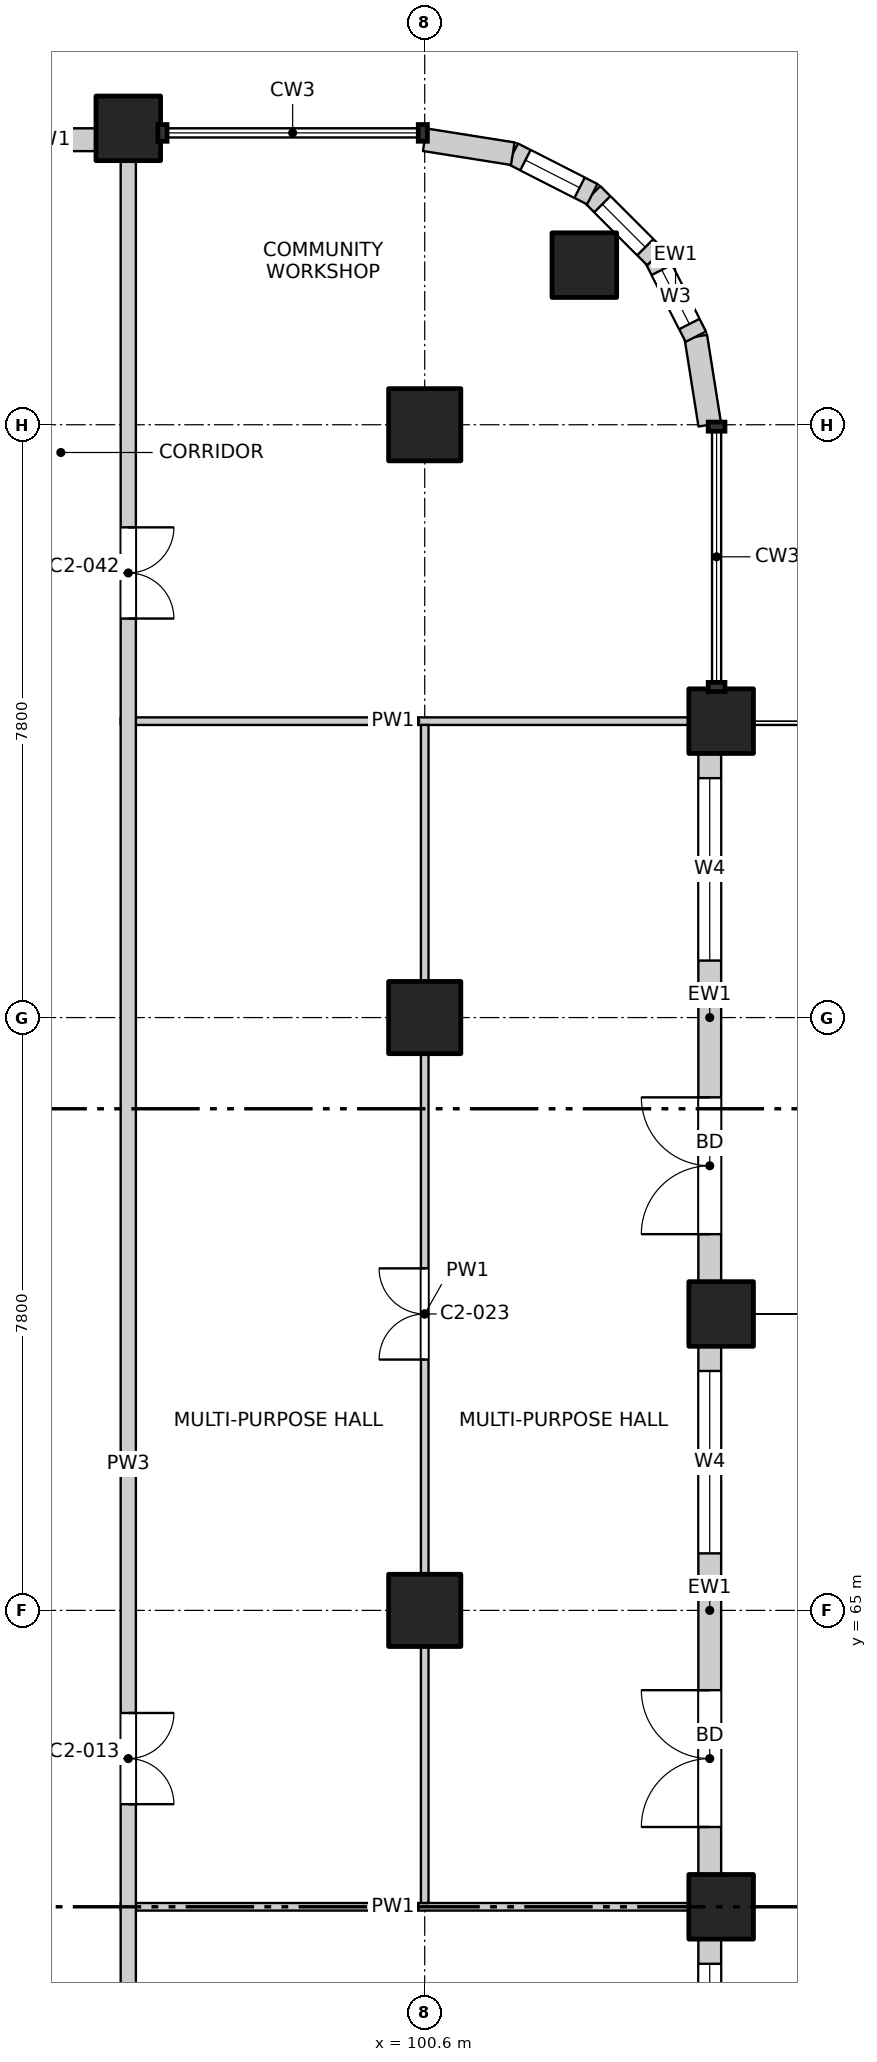
"""IFC4 building model, lengths in metres.
Left out: names, types, materials, properties, quantities, classifications, styles, units other than length and angle.
Written with IfcOpenShell. Run it as: python <this file> out.ifc"""

import sys

from ifc_helpers import new_model, si_unit, direction, frame, frame_2d, origin, origin_2d, place, context, subcontext, project, spatial, rectangle, extrude, element, fill, save


model = new_model("IFC4")
c1 = context("Model", 3, precision=1e-05, world=origin(), true_north=direction((0.0, 1.0)))
c2 = subcontext(c1, "Body", "Model", "MODEL_VIEW")
j1 = project(units=[si_unit("LENGTHUNIT", "METRE"), si_unit("PLANEANGLEUNIT", "RADIAN")], contexts=[c1])
p1 = place(None, origin())
s1 = spatial("IfcSite", under=j1, at=p1, CompositionType="ELEMENT")
p2 = place(p1, origin())
s2 = spatial("IfcBuilding", under=s1, at=p2, CompositionType="ELEMENT")
p3 = place(p2, frame((0.0, 0.0, 133.9)))
s3 = spatial("IfcBuildingStorey", under=s2, at=p3, CompositionType="ELEMENT", Elevation=133.9)
for number, where, z_axis, x_axis in (
    (1, (102.7, 82.7, -0.25), (0.0, 0.0, 1.0), (1.0, 0.0, 0.0)),
    (2, (104.5, 61.1, -0.25), (0.0, 0.0, 1.0), (1.0, 0.0, 0.0)),
    (3, (104.5, 68.9, -0.25), (0.0, 0.0, 1.0), (1.0, 0.0, 0.0)),
    (4, (104.5, 76.7, -0.25), (0.0, 0.0, 1.0), (1.0, 0.0, 0.0)),
    (5, (96.7, 84.5, -0.25), (0.0, 0.0, 1.0), (1.0, 0.0, 0.0)),
):
    element("IfcColumn", number, at=place(p3, frame(where, z_axis=z_axis, x_axis=x_axis)), inside=s3, PredefinedType="COLUMN", context=c2, shape_type="SweptSolid", body=[
        extrude(rectangle(XDim=0.85, YDim=0.85, at=origin_2d()), origin(), (0.0, 0.0, 1.0), 3.4),
    ])
for number, where, z_axis, x_axis in (
    (6, (100.6, 65.0, -0.25), (0.0, 0.0, 1.0), (1.0, 0.0, 0.0)),
    (7, (100.6, 72.8, -0.25), (0.0, 0.0, 1.0), (1.0, 0.0, 0.0)),
    (8, (100.6, 80.6, -0.25), (0.0, 0.0, 1.0), (1.0, 0.0, 0.0)),
):
    element("IfcColumn", number, at=place(p3, frame(where, z_axis=z_axis, x_axis=x_axis)), inside=s3, PredefinedType="COLUMN", context=c2, shape_type="SweptSolid", body=[
        extrude(rectangle(XDim=0.95, YDim=0.95, at=origin_2d()), origin(), (0.0, 0.0, 1.0), 3.4),
    ])
p4 = place(p3, frame((104.35, 53.725, 0.0), z_axis=(0.0, 0.0, 1.0), x_axis=(0.0, 1.0, 0.0)))
e9 = element("IfcWall", 9, at=p4, inside=s3, PredefinedType="SOLIDWALL", context=c2, shape_type="SweptSolid", body=[
    extrude(rectangle(XDim=6.95, YDim=0.3, at=frame_2d((3.475, 0.0))), origin(), (0.0, 0.0, 1.0), 2.7),
])
p5 = place(p4, frame((0.625, 0.0, 0.0)))
e10 = element("IfcOpeningElement", 10, at=p5, cuts=e9, PredefinedType="OPENING", context=c2, shape_type="SweptSolid", body=[
    extrude(rectangle(XDim=1.8, YDim=2.4, at=frame_2d((0.9, 1.2))), frame((0.0, 0.16, 0.0), z_axis=(0.0, -1.0, 0.0), x_axis=(1.0, 0.0, 0.0)), (0.0, 0.0, 1.0), 0.32),
])
p6 = place(p4, frame((4.225, 0.0, 0.6)))
e11 = element("IfcOpeningElement", 11, at=p6, cuts=e9, PredefinedType="OPENING", context=c2, shape_type="SweptSolid", body=[
    extrude(rectangle(XDim=2.4, YDim=2.1, at=frame_2d((1.2, 1.05))), frame((0.0, 0.16, 0.0), z_axis=(0.0, -1.0, 0.0), x_axis=(1.0, 0.0, 0.0)), (0.0, 0.0, 1.0), 0.32),
])
p7 = place(p3, frame((104.35, 61.525, 0.0), z_axis=(0.0, 0.0, 1.0), x_axis=(0.0, 1.0, 0.0)))
e12 = element("IfcWall", 12, at=p7, inside=s3, PredefinedType="SOLIDWALL", context=c2, shape_type="SweptSolid", body=[
    extrude(rectangle(XDim=6.95, YDim=0.3, at=frame_2d((3.475, 0.0))), origin(), (0.0, 0.0, 1.0), 2.7),
])
p8 = place(p7, frame((0.625, 0.0, 0.0)))
e13 = element("IfcOpeningElement", 13, at=p8, cuts=e12, PredefinedType="OPENING", context=c2, shape_type="SweptSolid", body=[
    extrude(rectangle(XDim=1.8, YDim=2.4, at=frame_2d((0.9, 1.2))), frame((0.0, 0.16, 0.0), z_axis=(0.0, -1.0, 0.0), x_axis=(1.0, 0.0, 0.0)), (0.0, 0.0, 1.0), 0.32),
])
p9 = place(p7, frame((4.225, 0.0, 0.6)))
e14 = element("IfcOpeningElement", 14, at=p9, cuts=e12, PredefinedType="OPENING", context=c2, shape_type="SweptSolid", body=[
    extrude(rectangle(XDim=2.4, YDim=2.1, at=frame_2d((1.2, 1.05))), frame((0.0, 0.16, 0.0), z_axis=(0.0, -1.0, 0.0), x_axis=(1.0, 0.0, 0.0)), (0.0, 0.0, 1.0), 0.32),
])
p10 = place(p3, frame((104.35, 69.325, 0.0), z_axis=(0.0, 0.0, 1.0), x_axis=(0.0, 1.0, 0.0)))
e15 = element("IfcWall", 15, at=p10, inside=s3, PredefinedType="SOLIDWALL", context=c2, shape_type="SweptSolid", body=[
    extrude(rectangle(XDim=6.95, YDim=0.3, at=frame_2d((3.475, 0.0))), origin(), (0.0, 0.0, 1.0), 2.7),
])
p11 = place(p10, frame((0.625, 0.0, 0.0)))
e16 = element("IfcOpeningElement", 16, at=p11, cuts=e15, PredefinedType="OPENING", context=c2, shape_type="SweptSolid", body=[
    extrude(rectangle(XDim=1.8, YDim=2.4, at=frame_2d((0.9, 1.2))), frame((0.0, 0.16, 0.0), z_axis=(0.0, -1.0, 0.0), x_axis=(1.0, 0.0, 0.0)), (0.0, 0.0, 1.0), 0.32),
])
p12 = place(p10, frame((4.225, 0.0, 0.6)))
e17 = element("IfcOpeningElement", 17, at=p12, cuts=e15, PredefinedType="OPENING", context=c2, shape_type="SweptSolid", body=[
    extrude(rectangle(XDim=2.4, YDim=2.1, at=frame_2d((1.2, 1.05))), frame((0.0, 0.16, 0.0), z_axis=(0.0, -1.0, 0.0), x_axis=(1.0, 0.0, 0.0)), (0.0, 0.0, 1.0), 0.32),
])
p13 = place(p3, frame((95.025, 84.35, 0.0), z_axis=(0.0, 0.0, 1.0), x_axis=(1.0, 0.0, 0.0)))
e18 = element("IfcWall", 18, at=p13, inside=s3, PredefinedType="SOLIDWALL", context=c2, shape_type="SweptSolid", body=[
    extrude(rectangle(XDim=1.25, YDim=0.3, at=frame_2d((0.625, 0.0))), origin(), (0.0, 0.0, 1.0), 2.7),
])
p14 = place(p3, frame((104.35, 80.6, 0.0), z_axis=(0.0, 0.0, 1.0), x_axis=(-0.156496880861, 0.987678452879, 0.0)))
e19 = element("IfcWall", 19, at=p14, inside=s3, PredefinedType="SOLIDWALL", context=c2, shape_type="SweptSolid", body=[
    extrude(rectangle(XDim=1.173, YDim=0.3, at=frame_2d((0.586, 0.0))), origin(), (0.0, 0.0, 1.0), 2.7),
])
p15 = place(p3, frame((104.167, 81.759, 0.0), z_axis=(0.0, 0.0, 1.0), x_axis=(-0.454025524128, 0.890988677504, 0.0)))
e20 = element("IfcWall", 20, at=p15, inside=s3, PredefinedType="SOLIDWALL", context=c2, shape_type="SweptSolid", body=[
    extrude(rectangle(XDim=1.173, YDim=0.3, at=frame_2d((0.587, 0.0))), origin(), (0.0, 0.0, 1.0), 2.7),
])
p16 = place(p15, frame((0.187, 0.0, 0.9)))
e21 = element("IfcOpeningElement", 21, at=p16, cuts=e20, PredefinedType="OPENING", context=c2, shape_type="SweptSolid", body=[
    extrude(rectangle(XDim=0.8, YDim=1.2, at=frame_2d((0.4, 0.6))), frame((0.0, 0.16, 0.0), z_axis=(0.0, -1.0, 0.0), x_axis=(1.0, 0.0, 0.0)), (0.0, 0.0, 1.0), 0.32),
])
p17 = place(p3, frame((103.634, 82.804, 0.0), z_axis=(0.0, 0.0, 1.0), x_axis=(-0.707106781187, 0.707106781187, 0.0)))
e22 = element("IfcWall", 22, at=p17, inside=s3, PredefinedType="SOLIDWALL", context=c2, shape_type="SweptSolid", body=[
    extrude(rectangle(XDim=1.173, YDim=0.3, at=frame_2d((0.586, 0.0))), origin(), (0.0, 0.0, 1.0), 2.7),
])
p18 = place(p17, frame((0.187, 0.0, 0.9)))
e23 = element("IfcOpeningElement", 23, at=p18, cuts=e22, PredefinedType="OPENING", context=c2, shape_type="SweptSolid", body=[
    extrude(rectangle(XDim=0.8, YDim=1.2, at=frame_2d((0.4, 0.6))), frame((0.0, 0.16, 0.0), z_axis=(0.0, -1.0, 0.0), x_axis=(1.0, 0.0, 0.0)), (0.0, 0.0, 1.0), 0.32),
])
p19 = place(p3, frame((102.804, 83.634, 0.0), z_axis=(0.0, 0.0, 1.0), x_axis=(-0.890988677504, 0.454025524128, 0.0)))
e24 = element("IfcWall", 24, at=p19, inside=s3, PredefinedType="SOLIDWALL", context=c2, shape_type="SweptSolid", body=[
    extrude(rectangle(XDim=1.173, YDim=0.3, at=frame_2d((0.587, 0.0))), origin(), (0.0, 0.0, 1.0), 2.7),
])
p20 = place(p19, frame((0.187, 0.0, 0.9)))
e25 = element("IfcOpeningElement", 25, at=p20, cuts=e24, PredefinedType="OPENING", context=c2, shape_type="SweptSolid", body=[
    extrude(rectangle(XDim=0.8, YDim=1.2, at=frame_2d((0.4, 0.6))), frame((0.0, 0.16, 0.0), z_axis=(0.0, -1.0, 0.0), x_axis=(1.0, 0.0, 0.0)), (0.0, 0.0, 1.0), 0.32),
])
p21 = place(p3, frame((101.759, 84.167, 0.0), z_axis=(0.0, 0.0, 1.0), x_axis=(-0.987678452879, 0.156496880861, 0.0)))
e26 = element("IfcWall", 26, at=p21, inside=s3, PredefinedType="SOLIDWALL", context=c2, shape_type="SweptSolid", body=[
    extrude(rectangle(XDim=1.173, YDim=0.3, at=frame_2d((0.586, 0.0))), origin(), (0.0, 0.0, 1.0), 2.7),
])
for number, where, z_axis, x_axis in (
    (27, (96.6, 61.1, 0.0), (0.0, 0.0, 1.0), (1.0, 0.0, 0.0)),
    (28, (96.6, 76.7, 0.0), (0.0, 0.0, 1.0), (1.0, 0.0, 0.0)),
):
    element("IfcWall", number, at=place(p3, frame(where, z_axis=z_axis, x_axis=x_axis)), inside=s3, PredefinedType="PARTITIONING", context=c2, shape_type="SweptSolid", body=[
        extrude(rectangle(XDim=7.765, YDim=0.1, at=frame_2d((3.882, 0.0))), origin(), (0.0, 0.0, 1.0), 2.55),
    ])
p22 = place(p3, frame((96.7, 49.5, 0.0), z_axis=(0.0, 0.0, 1.0), x_axis=(0.0, 1.0, 0.0)))
e29 = element("IfcWall", 29, at=p22, inside=s3, PredefinedType="PARTITIONING", context=c2, shape_type="SweptSolid", body=[
    extrude(rectangle(XDim=34.865, YDim=0.2, at=frame_2d((17.433, 0.0))), origin(), (0.0, 0.0, 1.0), 3.15),
])
p23 = place(p22, frame((9.05, 0.0, 0.0)))
e30 = element("IfcOpeningElement", 30, at=p23, cuts=e29, PredefinedType="OPENING", context=c2, shape_type="SweptSolid", body=[
    extrude(rectangle(XDim=1.2, YDim=2.1, at=frame_2d((0.6, 1.05))), frame((0.0, 0.11, 0.0), z_axis=(0.0, -1.0, 0.0), x_axis=(1.0, 0.0, 0.0)), (0.0, 0.0, 1.0), 0.22),
])
p24 = place(p22, frame((12.95, 0.0, 0.0)))
e31 = element("IfcOpeningElement", 31, at=p24, cuts=e29, PredefinedType="OPENING", context=c2, shape_type="SweptSolid", body=[
    extrude(rectangle(XDim=1.2, YDim=2.1, at=frame_2d((0.6, 1.05))), frame((0.0, 0.11, 0.0), z_axis=(0.0, -1.0, 0.0), x_axis=(1.0, 0.0, 0.0)), (0.0, 0.0, 1.0), 0.22),
])
p25 = place(p22, frame((28.55, 0.0, 0.0)))
e32 = element("IfcOpeningElement", 32, at=p25, cuts=e29, PredefinedType="OPENING", context=c2, shape_type="SweptSolid", body=[
    extrude(rectangle(XDim=1.2, YDim=2.1, at=frame_2d((0.6, 1.05))), frame((0.0, 0.11, 0.0), z_axis=(0.0, -1.0, 0.0), x_axis=(1.0, 0.0, 0.0)), (0.0, 0.0, 1.0), 0.22),
])
p26 = place(p3, frame((100.6, 61.15, 0.0), z_axis=(0.0, 0.0, 1.0), x_axis=(0.0, 1.0, 0.0)))
e33 = element("IfcWall", 33, at=p26, inside=s3, PredefinedType="PARTITIONING", context=c2, shape_type="SweptSolid", body=[
    extrude(rectangle(XDim=15.5, YDim=0.1, at=frame_2d((7.75, 0.0))), origin(), (0.0, 0.0, 1.0), 3.15),
])
p27 = place(p26, frame((7.15, 0.0, 0.0)))
e34 = element("IfcOpeningElement", 34, at=p27, cuts=e33, PredefinedType="OPENING", context=c2, shape_type="SweptSolid", body=[
    extrude(rectangle(XDim=1.2, YDim=2.1, at=frame_2d((0.6, 1.05))), frame((0.0, 0.06, 0.0), z_axis=(0.0, -1.0, 0.0), x_axis=(1.0, 0.0, 0.0)), (0.0, 0.0, 1.0), 0.12),
])
p28 = place(p6, origin())
e35 = element("IfcWindow", 35, at=p28, inside=s3, PartitioningType="SINGLE_PANEL", PredefinedType="WINDOW", context=c2, shape_type="SweptSolid", body=[
    extrude(rectangle(XDim=2.4, YDim=2.1, at=frame_2d((1.2, 1.05))), frame((0.0, 0.03, 0.0), z_axis=(0.0, -1.0, 0.0), x_axis=(1.0, 0.0, 0.0)), (0.0, 0.0, 1.0), 0.06),
])
fill(e11, e35)
p29 = place(p8, origin())
e36 = element("IfcDoor", 36, at=p29, inside=s3, OperationType="DOUBLE_DOOR_SINGLE_SWING", PredefinedType="DOOR", context=c2, shape_type="SweptSolid", body=[
    extrude(rectangle(XDim=1.8, YDim=2.4, at=frame_2d((0.9, 1.2))), frame((0.0, 0.025, 0.0), z_axis=(0.0, -1.0, 0.0), x_axis=(1.0, 0.0, 0.0)), (0.0, 0.0, 1.0), 0.05),
])
fill(e13, e36)
p30 = place(p9, origin())
e37 = element("IfcWindow", 37, at=p30, inside=s3, PartitioningType="SINGLE_PANEL", PredefinedType="WINDOW", context=c2, shape_type="SweptSolid", body=[
    extrude(rectangle(XDim=2.4, YDim=2.1, at=frame_2d((1.2, 1.05))), frame((0.0, 0.03, 0.0), z_axis=(0.0, -1.0, 0.0), x_axis=(1.0, 0.0, 0.0)), (0.0, 0.0, 1.0), 0.06),
])
fill(e14, e37)
p31 = place(p11, origin())
e38 = element("IfcDoor", 38, at=p31, inside=s3, OperationType="DOUBLE_DOOR_SINGLE_SWING", PredefinedType="DOOR", context=c2, shape_type="SweptSolid", body=[
    extrude(rectangle(XDim=1.8, YDim=2.4, at=frame_2d((0.9, 1.2))), frame((0.0, 0.025, 0.0), z_axis=(0.0, -1.0, 0.0), x_axis=(1.0, 0.0, 0.0)), (0.0, 0.0, 1.0), 0.05),
])
fill(e16, e38)
p32 = place(p12, origin())
e39 = element("IfcWindow", 39, at=p32, inside=s3, PartitioningType="SINGLE_PANEL", PredefinedType="WINDOW", context=c2, shape_type="SweptSolid", body=[
    extrude(rectangle(XDim=2.4, YDim=2.1, at=frame_2d((1.2, 1.05))), frame((0.0, 0.03, 0.0), z_axis=(0.0, -1.0, 0.0), x_axis=(1.0, 0.0, 0.0)), (0.0, 0.0, 1.0), 0.06),
])
fill(e17, e39)
p33 = place(p16, origin())
e40 = element("IfcWindow", 40, at=p33, inside=s3, PartitioningType="SINGLE_PANEL", PredefinedType="WINDOW", context=c2, shape_type="SweptSolid", body=[
    extrude(rectangle(XDim=0.8, YDim=1.2, at=frame_2d((0.4, 0.6))), frame((0.0, 0.03, 0.0), z_axis=(0.0, -1.0, 0.0), x_axis=(1.0, 0.0, 0.0)), (0.0, 0.0, 1.0), 0.06),
])
fill(e21, e40)
p34 = place(p18, origin())
e41 = element("IfcWindow", 41, at=p34, inside=s3, PartitioningType="SINGLE_PANEL", PredefinedType="WINDOW", context=c2, shape_type="SweptSolid", body=[
    extrude(rectangle(XDim=0.8, YDim=1.2, at=frame_2d((0.4, 0.6))), frame((0.0, 0.03, 0.0), z_axis=(0.0, -1.0, 0.0), x_axis=(1.0, 0.0, 0.0)), (0.0, 0.0, 1.0), 0.06),
])
fill(e23, e41)
p35 = place(p20, origin())
e42 = element("IfcWindow", 42, at=p35, inside=s3, PartitioningType="SINGLE_PANEL", PredefinedType="WINDOW", context=c2, shape_type="SweptSolid", body=[
    extrude(rectangle(XDim=0.8, YDim=1.2, at=frame_2d((0.4, 0.6))), frame((0.0, 0.03, 0.0), z_axis=(0.0, -1.0, 0.0), x_axis=(1.0, 0.0, 0.0)), (0.0, 0.0, 1.0), 0.06),
])
fill(e25, e42)
p36 = place(p24, origin())
e43 = element("IfcDoor", 43, at=p36, inside=s3, OperationType="DOUBLE_DOOR_SINGLE_SWING", PredefinedType="DOOR", context=c2, shape_type="SweptSolid", body=[
    extrude(rectangle(XDim=1.2, YDim=2.1, at=frame_2d((0.6, 1.05))), frame((0.0, 0.025, 0.0), z_axis=(0.0, -1.0, 0.0), x_axis=(1.0, 0.0, 0.0)), (0.0, 0.0, 1.0), 0.05),
])
fill(e31, e43)
p37 = place(p27, origin())
e44 = element("IfcDoor", 44, at=p37, inside=s3, OperationType="DOUBLE_DOOR_SINGLE_SWING", PredefinedType="DOOR", context=c2, shape_type="SweptSolid", body=[
    extrude(rectangle(XDim=1.2, YDim=2.1, at=frame_2d((0.6, 1.05))), frame((0.0, 0.025, 0.0), z_axis=(0.0, -1.0, 0.0), x_axis=(1.0, 0.0, 0.0)), (0.0, 0.0, 1.0), 0.05),
])
fill(e34, e44)
p38 = place(p25, origin())
e45 = element("IfcDoor", 45, at=p38, inside=s3, OperationType="DOUBLE_DOOR_SINGLE_SWING", PredefinedType="DOOR", context=c2, shape_type="SweptSolid", body=[
    extrude(rectangle(XDim=1.2, YDim=2.1, at=frame_2d((0.6, 1.05))), frame((0.0, 0.025, 0.0), z_axis=(0.0, -1.0, 0.0), x_axis=(1.0, 0.0, 0.0)), (0.0, 0.0, 1.0), 0.05),
])
fill(e32, e45)
save(model, sys.argv[1])
